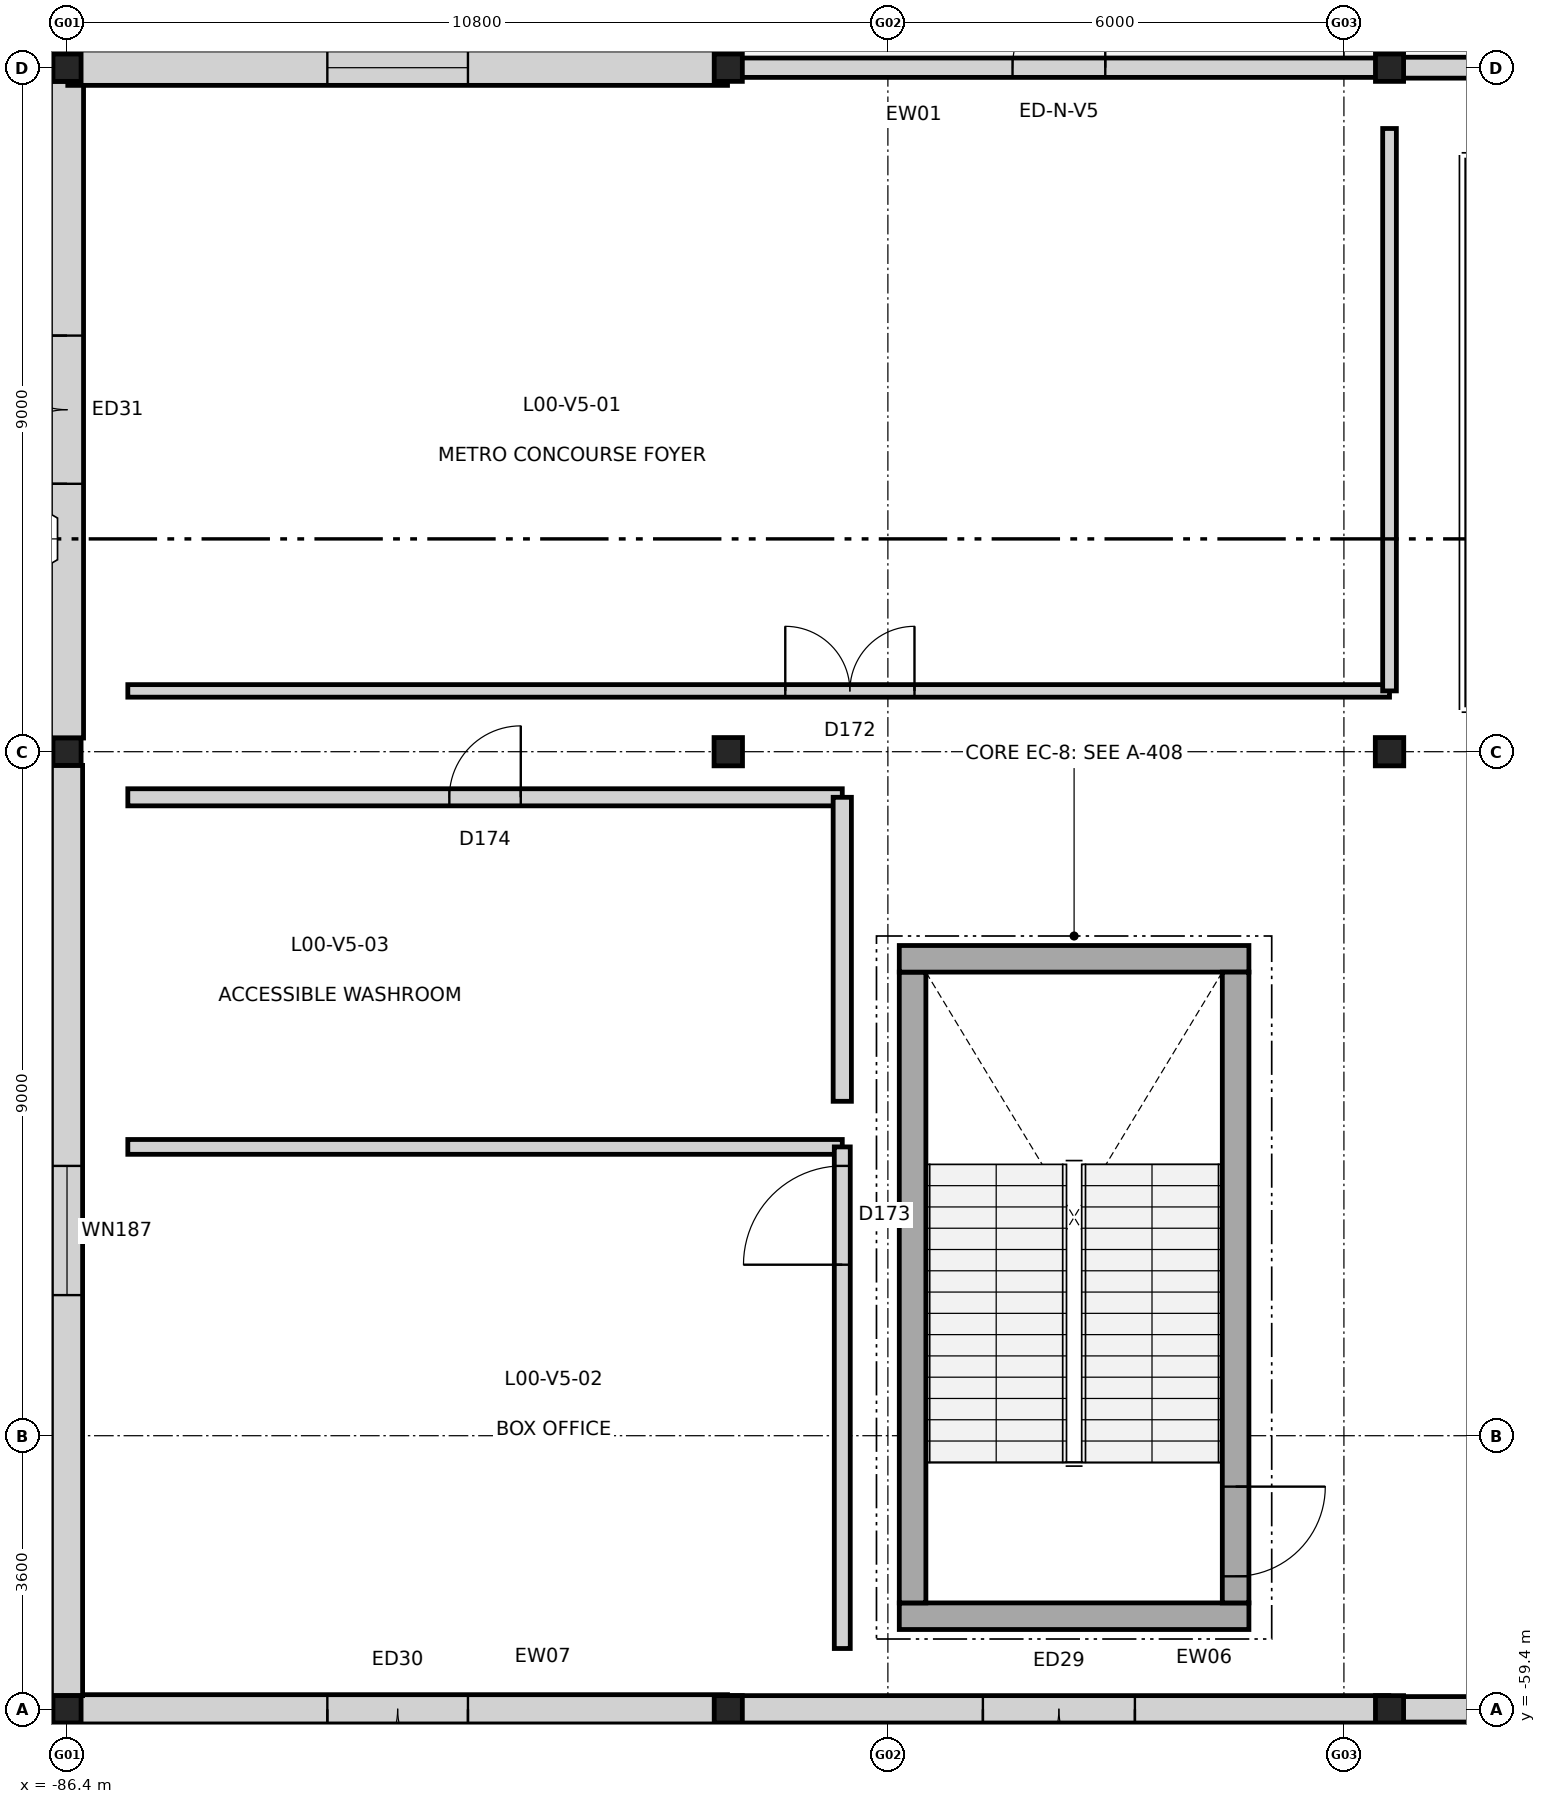
"""IFC4 building model, lengths in metres.
Left out: names, types, materials, properties, quantities, classifications, styles, units other than length and angle.
Written with IfcOpenShell. Run it as: python <this file> out.ifc"""

import sys

from ifc_helpers import new_model, si_unit, direction, frame, frame_2d, origin, origin_2d, place, context, subcontext, project, spatial, rectangle, i_section, extrude, element, fill, save


model = new_model("IFC4")
c1 = context("Model", 3, precision=1e-05, world=origin(), true_north=direction((0.0, 1.0)))
c2 = subcontext(c1, "Body", "Model", "MODEL_VIEW")
j1 = project(units=[si_unit("LENGTHUNIT", "METRE"), si_unit("PLANEANGLEUNIT", "RADIAN")], contexts=[c1])
p1 = place(None, origin())
s1 = spatial("IfcSite", under=j1, at=p1, CompositionType="ELEMENT")
p2 = place(p1, origin())
s2 = spatial("IfcBuilding", under=s1, at=p2, CompositionType="ELEMENT")
p3 = place(p2, origin())
s3 = spatial("IfcBuildingStorey", under=s2, at=p3, CompositionType="ELEMENT", Elevation=0.0)
for number, where, z_axis, x_axis in (
    (1, (-86.4, -59.4, 0.0), (0.0, 0.0, 1.0), (1.0, 0.0, 0.0)),
    (2, (-86.4, -46.8, 0.0), (0.0, 0.0, 1.0), (1.0, 0.0, 0.0)),
    (3, (-86.4, -37.8, 0.0), (0.0, 0.0, 1.0), (1.0, 0.0, 0.0)),
    (4, (-77.7, -59.4, 0.0), (0.0, 0.0, 1.0), (1.0, 0.0, 0.0)),
):
    element("IfcColumn", number, at=place(p3, frame(where, z_axis=z_axis, x_axis=x_axis)), inside=s3, PredefinedType="COLUMN", context=c2, shape_type="SweptSolid", body=[
        extrude(i_section(OverallWidth=0.37, OverallDepth=0.36, WebThickness=0.012, FlangeThickness=0.02, at=origin_2d()), origin(), (0.0, 0.0, 1.0), 5.4),
    ])
p4 = place(p3, frame((-77.7, -46.8, 0.0), z_axis=(0.0, 0.0, 1.0), x_axis=(1.0, 0.0, 0.0)))
e5 = element("IfcColumn", 5, at=p4, inside=s3, PredefinedType="COLUMN", context=c2, shape_type="SweptSolid", body=[
    extrude(i_section(OverallWidth=0.374, OverallDepth=0.372, WebThickness=0.016, FlangeThickness=0.026, at=origin_2d()), origin(), (0.0, 0.0, 1.0), 5.4),
])
for number, where, z_axis, x_axis in (
    (6, (-77.7, -37.8, 0.0), (0.0, 0.0, 1.0), (1.0, 0.0, 0.0)),
    (7, (-69.0, -59.4, 0.0), (0.0, 0.0, 1.0), (1.0, 0.0, 0.0)),
):
    element("IfcColumn", number, at=place(p3, frame(where, z_axis=z_axis, x_axis=x_axis)), inside=s3, PredefinedType="COLUMN", context=c2, shape_type="SweptSolid", body=[
        extrude(i_section(OverallWidth=0.37, OverallDepth=0.36, WebThickness=0.012, FlangeThickness=0.02, at=origin_2d()), origin(), (0.0, 0.0, 1.0), 5.4),
    ])
p5 = place(p3, frame((-69.0, -46.8, 0.0), z_axis=(0.0, 0.0, 1.0), x_axis=(1.0, 0.0, 0.0)))
e8 = element("IfcColumn", 8, at=p5, inside=s3, PredefinedType="COLUMN", context=c2, shape_type="SweptSolid", body=[
    extrude(i_section(OverallWidth=0.374, OverallDepth=0.372, WebThickness=0.016, FlangeThickness=0.026, at=origin_2d()), origin(), (0.0, 0.0, 1.0), 5.4),
])
p6 = place(p3, frame((-69.0, -37.8, 0.0), z_axis=(0.0, 0.0, 1.0), x_axis=(1.0, 0.0, 0.0)))
e9 = element("IfcColumn", 9, at=p6, inside=s3, PredefinedType="COLUMN", context=c2, shape_type="SweptSolid", body=[
    extrude(i_section(OverallWidth=0.37, OverallDepth=0.36, WebThickness=0.012, FlangeThickness=0.02, at=origin_2d()), origin(), (0.0, 0.0, 1.0), 5.4),
])
p7 = place(p3, frame((-60.31, -59.4, 0.0), z_axis=(0.0, 0.0, 1.0), x_axis=(-1.0, 0.0, 0.0)))
e10 = element("IfcWall", 10, at=p7, inside=s3, PredefinedType="STANDARD", context=c2, shape_type="SweptSolid", body=[
    extrude(rectangle(XDim=8.68, YDim=0.335, at=frame_2d((4.34, 0.0))), origin(), (0.0, 0.0, 1.0), 4.32),
])
p8 = place(p7, frame((3.14, 0.0, 0.0)))
e11 = element("IfcOpeningElement", 11, at=p8, cuts=e10, PredefinedType="OPENING", context=c2, shape_type="SweptSolid", body=[
    extrude(rectangle(XDim=2.4, YDim=2.5, at=frame_2d((1.2, 1.25))), frame((0.0, 0.177, 0.0), z_axis=(0.0, -1.0, 0.0), x_axis=(1.0, 0.0, 0.0)), (0.0, 0.0, 1.0), 0.355),
])
p9 = place(p3, frame((-69.01, -59.4, 0.0), z_axis=(0.0, 0.0, 1.0), x_axis=(-1.0, 0.0, 0.0)))
e12 = element("IfcWall", 12, at=p9, inside=s3, PredefinedType="STANDARD", context=c2, shape_type="SweptSolid", body=[
    extrude(rectangle(XDim=8.68, YDim=0.36, at=frame_2d((4.34, 0.0))), origin(), (0.0, 0.0, 1.0), 4.32),
])
p10 = place(p9, frame((3.34, 0.0, 0.0)))
e13 = element("IfcOpeningElement", 13, at=p10, cuts=e12, PredefinedType="OPENING", context=c2, shape_type="SweptSolid", body=[
    extrude(rectangle(XDim=2.0, YDim=2.4, at=frame_2d((1.0, 1.2))), frame((0.0, 0.19, 0.0), z_axis=(0.0, -1.0, 0.0), x_axis=(1.0, 0.0, 0.0)), (0.0, 0.0, 1.0), 0.38),
])
p11 = place(p3, frame((-77.71, -59.4, 0.0), z_axis=(0.0, 0.0, 1.0), x_axis=(-1.0, 0.0, 0.0)))
e14 = element("IfcWall", 14, at=p11, inside=s3, PredefinedType="STANDARD", context=c2, shape_type="SweptSolid", body=[
    extrude(rectangle(XDim=8.68, YDim=0.385, at=frame_2d((4.34, 0.0))), origin(), (0.0, 0.0, 1.0), 4.32),
])
p12 = place(p11, frame((3.415, 0.0, 0.0)))
e15 = element("IfcOpeningElement", 15, at=p12, cuts=e14, PredefinedType="OPENING", context=c2, shape_type="SweptSolid", body=[
    extrude(rectangle(XDim=1.85, YDim=2.25, at=frame_2d((0.925, 1.125))), frame((0.0, 0.202, 0.0), z_axis=(0.0, -1.0, 0.0), x_axis=(1.0, 0.0, 0.0)), (0.0, 0.0, 1.0), 0.405),
])
p13 = place(p3, frame((-86.4, -59.22, 0.0), z_axis=(0.0, 0.0, 1.0), x_axis=(0.0, 1.0, 0.0)))
e16 = element("IfcWall", 16, at=p13, inside=s3, PredefinedType="STANDARD", context=c2, shape_type="SweptSolid", body=[
    extrude(rectangle(XDim=12.24, YDim=0.41, at=frame_2d((6.12, 0.0))), origin(), (0.0, 0.0, 1.0), 4.32),
])
p14 = place(p13, frame((5.27, 0.0, 0.85)))
e17 = element("IfcOpeningElement", 17, at=p14, cuts=e16, PredefinedType="OPENING", context=c2, shape_type="SweptSolid", body=[
    extrude(rectangle(XDim=1.7, YDim=1.75, at=frame_2d((0.85, 0.875))), frame((0.0, 0.215, 0.0), z_axis=(0.0, -1.0, 0.0), x_axis=(1.0, 0.0, 0.0)), (0.0, 0.0, 1.0), 0.43),
])
p15 = place(p3, frame((-86.4, -46.62, 0.0), z_axis=(0.0, 0.0, 1.0), x_axis=(0.0, 1.0, 0.0)))
e18 = element("IfcWall", 18, at=p15, inside=s3, PredefinedType="STANDARD", context=c2, shape_type="SweptSolid", body=[
    extrude(rectangle(XDim=8.64, YDim=0.435, at=frame_2d((4.32, 0.0))), origin(), (0.0, 0.0, 1.0), 4.404),
])
p16 = place(p15, frame((3.345, 0.0, 0.0)))
e19 = element("IfcOpeningElement", 19, at=p16, cuts=e18, PredefinedType="OPENING", context=c2, shape_type="SweptSolid", body=[
    extrude(rectangle(XDim=1.95, YDim=2.35, at=frame_2d((0.975, 1.175))), frame((0.0, 0.228, 0.0), z_axis=(0.0, -1.0, 0.0), x_axis=(1.0, 0.0, 0.0)), (0.0, 0.0, 1.0), 0.455),
])
p17 = place(p3, frame((-86.39, -37.8, 0.0), z_axis=(0.0, 0.0, 1.0), x_axis=(1.0, 0.0, 0.0)))
e20 = element("IfcWall", 20, at=p17, inside=s3, PredefinedType="STANDARD", context=c2, shape_type="SweptSolid", body=[
    extrude(rectangle(XDim=8.68, YDim=0.465, at=frame_2d((4.34, 0.0))), origin(), (0.0, 0.0, 1.0), 4.32),
])
p18 = place(p17, frame((3.415, 0.0, 0.85)))
e21 = element("IfcOpeningElement", 21, at=p18, cuts=e20, PredefinedType="OPENING", context=c2, shape_type="SweptSolid", body=[
    extrude(rectangle(XDim=1.85, YDim=1.75, at=frame_2d((0.925, 0.875))), frame((0.0, 0.242, 0.0), z_axis=(0.0, -1.0, 0.0), x_axis=(1.0, 0.0, 0.0)), (0.0, 0.0, 1.0), 0.485),
])
p19 = place(p3, frame((-77.69, -37.8, 0.0), z_axis=(0.0, 0.0, 1.0), x_axis=(1.0, 0.0, 0.0)))
e22 = element("IfcWall", 22, at=p19, inside=s3, PredefinedType="STANDARD", context=c2, shape_type="SweptSolid", body=[
    extrude(rectangle(XDim=8.68, YDim=0.255, at=frame_2d((4.34, 0.0))), origin(), (0.0, 0.0, 1.0), 4.32),
])
p20 = place(p19, frame((3.73, 0.0, 0.0)))
e23 = element("IfcOpeningElement", 23, at=p20, cuts=e22, PredefinedType="OPENING", context=c2, shape_type="SweptSolid", body=[
    extrude(rectangle(XDim=1.22, YDim=2.3, at=frame_2d((0.61, 1.15))), frame((0.0, 0.137, 0.0), z_axis=(0.0, -1.0, 0.0), x_axis=(1.0, 0.0, 0.0)), (0.0, 0.0, 1.0), 0.275),
])
p21 = place(p3, frame((-68.99, -37.8, 0.0), z_axis=(0.0, 0.0, 1.0), x_axis=(1.0, 0.0, 0.0)))
e24 = element("IfcWall", 24, at=p21, inside=s3, PredefinedType="STANDARD", context=c2, shape_type="SweptSolid", body=[
    extrude(rectangle(XDim=8.68, YDim=0.275, at=frame_2d((4.34, 0.0))), origin(), (0.0, 0.0, 1.0), 4.32),
])
p22 = place(p21, frame((3.465, 0.0, 0.0)))
e25 = element("IfcOpeningElement", 25, at=p22, cuts=e24, PredefinedType="OPENING", context=c2, shape_type="SweptSolid", body=[
    extrude(rectangle(XDim=1.75, YDim=2.3, at=frame_2d((0.875, 1.15))), frame((0.0, 0.147, 0.0), z_axis=(0.0, -1.0, 0.0), x_axis=(1.0, 0.0, 0.0)), (0.0, 0.0, 1.0), 0.295),
])
p23 = place(p3, frame((-70.85, -58.175, 0.0), z_axis=(0.0, 0.0, 1.0), x_axis=(-1.0, 0.0, 0.0)))
e26 = element("IfcWall", 26, at=p23, inside=s3, PredefinedType="SHEAR", context=c2, shape_type="SweptSolid", body=[
    extrude(rectangle(XDim=4.6, YDim=0.35, at=frame_2d((2.3, 0.0))), origin(), (0.0, 0.0, 1.0), 5.4),
])
p24 = place(p3, frame((-75.275, -58.0, 0.0), z_axis=(0.0, 0.0, 1.0), x_axis=(0.0, 1.0, 0.0)))
e27 = element("IfcWall", 27, at=p24, inside=s3, PredefinedType="SHEAR", context=c2, shape_type="SweptSolid", body=[
    extrude(rectangle(XDim=8.3, YDim=0.35, at=frame_2d((4.15, 0.0))), origin(), (0.0, 0.0, 1.0), 5.4),
])
p25 = place(p3, frame((-75.45, -49.525, 0.0), z_axis=(0.0, 0.0, 1.0), x_axis=(1.0, 0.0, 0.0)))
e28 = element("IfcWall", 28, at=p25, inside=s3, PredefinedType="SHEAR", context=c2, shape_type="SweptSolid", body=[
    extrude(rectangle(XDim=4.6, YDim=0.35, at=frame_2d((2.3, 0.0))), origin(), (0.0, 0.0, 1.0), 5.4),
])
p26 = place(p3, frame((-71.025, -49.7, 0.0), z_axis=(0.0, 0.0, 1.0), x_axis=(0.0, -1.0, 0.0)))
e29 = element("IfcWall", 29, at=p26, inside=s3, PredefinedType="SHEAR", context=c2, shape_type="SweptSolid", body=[
    extrude(rectangle(XDim=8.3, YDim=0.35, at=frame_2d((4.15, 0.0))), origin(), (0.0, 0.0, 1.0), 5.4),
])
p27 = place(p26, frame((6.77, 0.0, 0.0)))
e30 = element("IfcOpeningElement", 30, at=p27, cuts=e29, PredefinedType="OPENING", context=c2, shape_type="SweptSolid", body=[
    extrude(rectangle(XDim=1.18, YDim=2.15, at=frame_2d((0.59, 1.075))), frame((0.0, 0.185, 0.0), z_axis=(0.0, -1.0, 0.0), x_axis=(1.0, 0.0, 0.0)), (0.0, 0.0, 1.0), 0.37),
])
p28 = place(p3, frame((-85.6, -46.0, 0.0), z_axis=(0.0, 0.0, 1.0), x_axis=(1.0, 0.0, 0.0)))
e31 = element("IfcWall", 31, at=p28, inside=s3, PredefinedType="PARTITIONING", context=c2, shape_type="SweptSolid", body=[
    extrude(rectangle(XDim=16.6, YDim=0.165, at=frame_2d((8.3, 0.0))), origin(), (0.0, 0.0, 1.0), 5.02),
])
p29 = place(p28, frame((8.65, 0.0, 0.0)))
e32 = element("IfcOpeningElement", 32, at=p29, cuts=e31, PredefinedType="OPENING", context=c2, shape_type="SweptSolid", body=[
    extrude(rectangle(XDim=1.7, YDim=2.25, at=frame_2d((0.85, 1.125))), frame((0.0, 0.093, 0.0), z_axis=(0.0, -1.0, 0.0), x_axis=(1.0, 0.0, 0.0)), (0.0, 0.0, 1.0), 0.185),
])
p30 = place(p3, frame((-69.0, -46.0, 0.0), z_axis=(0.0, 0.0, 1.0), x_axis=(0.0, 1.0, 0.0)))
e33 = element("IfcWall", 33, at=p30, inside=s3, PredefinedType="PARTITIONING", context=c2, shape_type="SweptSolid", body=[
    extrude(rectangle(XDim=7.4, YDim=0.18, at=frame_2d((3.7, 0.0))), origin(), (0.0, 0.0, 1.0), 4.309),
])
p31 = place(p3, frame((-85.6, -52.0, 0.0), z_axis=(0.0, 0.0, 1.0), x_axis=(1.0, 0.0, 0.0)))
e34 = element("IfcWall", 34, at=p31, inside=s3, PredefinedType="PARTITIONING", context=c2, shape_type="SweptSolid", body=[
    extrude(rectangle(XDim=9.4, YDim=0.195, at=frame_2d((4.7, 0.0))), origin(), (0.0, 0.0, 1.0), 5.02),
])
p32 = place(p3, frame((-76.2, -58.6, 0.0), z_axis=(0.0, 0.0, 1.0), x_axis=(0.0, 1.0, 0.0)))
e35 = element("IfcWall", 35, at=p32, inside=s3, PredefinedType="PARTITIONING", context=c2, shape_type="SweptSolid", body=[
    extrude(rectangle(XDim=6.6, YDim=0.21, at=frame_2d((3.3, 0.0))), origin(), (0.0, 0.0, 1.0), 5.02),
])
p33 = place(p32, frame((5.05, 0.0, 0.0)))
e36 = element("IfcOpeningElement", 36, at=p33, cuts=e35, PredefinedType="OPENING", context=c2, shape_type="SweptSolid", body=[
    extrude(rectangle(XDim=1.3, YDim=2.25, at=frame_2d((0.65, 1.125))), frame((0.0, 0.115, 0.0), z_axis=(0.0, -1.0, 0.0), x_axis=(1.0, 0.0, 0.0)), (0.0, 0.0, 1.0), 0.23),
])
p34 = place(p3, frame((-85.6, -47.4, 0.0), z_axis=(0.0, 0.0, 1.0), x_axis=(1.0, 0.0, 0.0)))
e37 = element("IfcWall", 37, at=p34, inside=s3, PredefinedType="PARTITIONING", context=c2, shape_type="SweptSolid", body=[
    extrude(rectangle(XDim=9.4, YDim=0.225, at=frame_2d((4.7, 0.0))), origin(), (0.0, 0.0, 1.0), 5.02),
])
p35 = place(p34, frame((4.23, 0.0, 0.0)))
e38 = element("IfcOpeningElement", 38, at=p35, cuts=e37, PredefinedType="OPENING", context=c2, shape_type="SweptSolid", body=[
    extrude(rectangle(XDim=0.94, YDim=2.1, at=frame_2d((0.47, 1.05))), frame((0.0, 0.123, 0.0), z_axis=(0.0, -1.0, 0.0), x_axis=(1.0, 0.0, 0.0)), (0.0, 0.0, 1.0), 0.245),
])
p36 = place(p3, frame((-76.2, -51.4, 0.0), z_axis=(0.0, 0.0, 1.0), x_axis=(0.0, 1.0, 0.0)))
e39 = element("IfcWall", 39, at=p36, inside=s3, PredefinedType="PARTITIONING", context=c2, shape_type="SweptSolid", body=[
    extrude(rectangle(XDim=4.0, YDim=0.24, at=frame_2d((2.0, 0.0))), origin(), (0.0, 0.0, 1.0), 5.02),
])
p37 = place(p10, origin())
e40 = element("IfcDoor", 40, at=p37, inside=s3, OperationType="DOUBLE_DOOR_SINGLE_SWING", PredefinedType="DOOR", context=c2, shape_type="SweptSolid", body=[
    extrude(rectangle(XDim=2.0, YDim=2.4, at=frame_2d((1.0, 1.2))), frame((0.0, 0.025, 0.0), z_axis=(0.0, -1.0, 0.0), x_axis=(1.0, 0.0, 0.0)), (0.0, 0.0, 1.0), 0.05),
])
fill(e13, e40)
p38 = place(p12, origin())
e41 = element("IfcDoor", 41, at=p38, inside=s3, OperationType="DOUBLE_DOOR_SINGLE_SWING", PredefinedType="DOOR", context=c2, shape_type="SweptSolid", body=[
    extrude(rectangle(XDim=1.85, YDim=2.25, at=frame_2d((0.925, 1.125))), frame((0.0, 0.025, 0.0), z_axis=(0.0, -1.0, 0.0), x_axis=(1.0, 0.0, 0.0)), (0.0, 0.0, 1.0), 0.05),
])
fill(e15, e41)
p39 = place(p14, origin())
e42 = element("IfcWindow", 42, at=p39, inside=s3, PartitioningType="SINGLE_PANEL", PredefinedType="WINDOW", context=c2, shape_type="SweptSolid", body=[
    extrude(rectangle(XDim=1.7, YDim=1.75, at=frame_2d((0.85, 0.875))), frame((0.0, 0.03, 0.0), z_axis=(0.0, -1.0, 0.0), x_axis=(1.0, 0.0, 0.0)), (0.0, 0.0, 1.0), 0.06),
])
fill(e17, e42)
p40 = place(p16, origin())
e43 = element("IfcDoor", 43, at=p40, inside=s3, OperationType="DOUBLE_DOOR_SINGLE_SWING", PredefinedType="DOOR", context=c2, shape_type="SweptSolid", body=[
    extrude(rectangle(XDim=1.95, YDim=2.35, at=frame_2d((0.975, 1.175))), frame((0.0, 0.025, 0.0), z_axis=(0.0, -1.0, 0.0), x_axis=(1.0, 0.0, 0.0)), (0.0, 0.0, 1.0), 0.05),
])
fill(e19, e43)
p41 = place(p18, origin())
e44 = element("IfcWindow", 44, at=p41, inside=s3, PartitioningType="SINGLE_PANEL", PredefinedType="WINDOW", context=c2, shape_type="SweptSolid", body=[
    extrude(rectangle(XDim=1.85, YDim=1.75, at=frame_2d((0.925, 0.875))), frame((0.0, 0.03, 0.0), z_axis=(0.0, -1.0, 0.0), x_axis=(1.0, 0.0, 0.0)), (0.0, 0.0, 1.0), 0.06),
])
fill(e21, e44)
p42 = place(p20, origin())
e45 = element("IfcDoor", 45, at=p42, inside=s3, OperationType="SINGLE_SWING_RIGHT", PredefinedType="DOOR", context=c2, shape_type="SweptSolid", body=[
    extrude(rectangle(XDim=1.22, YDim=2.3, at=frame_2d((0.61, 1.15))), frame((0.0, 0.025, 0.0), z_axis=(0.0, -1.0, 0.0), x_axis=(1.0, 0.0, 0.0)), (0.0, 0.0, 1.0), 0.05),
])
fill(e23, e45)
p43 = place(p27, origin())
e46 = element("IfcDoor", 46, at=p43, inside=s3, OperationType="SINGLE_SWING_LEFT", PredefinedType="DOOR", context=c2, shape_type="SweptSolid", body=[
    extrude(rectangle(XDim=1.18, YDim=2.15, at=frame_2d((0.59, 1.075))), frame((0.0, 0.025, 0.0), z_axis=(0.0, -1.0, 0.0), x_axis=(1.0, 0.0, 0.0)), (0.0, 0.0, 1.0), 0.05),
])
fill(e30, e46)
p44 = place(p29, origin())
e47 = element("IfcDoor", 47, at=p44, inside=s3, OperationType="DOUBLE_DOOR_SINGLE_SWING", PredefinedType="DOOR", context=c2, shape_type="SweptSolid", body=[
    extrude(rectangle(XDim=1.7, YDim=2.25, at=frame_2d((0.85, 1.125))), frame((0.0, 0.025, 0.0), z_axis=(0.0, -1.0, 0.0), x_axis=(1.0, 0.0, 0.0)), (0.0, 0.0, 1.0), 0.05),
])
fill(e32, e47)
p45 = place(p33, origin())
e48 = element("IfcDoor", 48, at=p45, inside=s3, OperationType="SINGLE_SWING_LEFT", PredefinedType="DOOR", context=c2, shape_type="SweptSolid", body=[
    extrude(rectangle(XDim=1.3, YDim=2.25, at=frame_2d((0.65, 1.125))), frame((0.0, 0.025, 0.0), z_axis=(0.0, -1.0, 0.0), x_axis=(1.0, 0.0, 0.0)), (0.0, 0.0, 1.0), 0.05),
])
fill(e36, e48)
p46 = place(p35, origin())
e49 = element("IfcDoor", 49, at=p46, inside=s3, OperationType="SINGLE_SWING_RIGHT", PredefinedType="DOOR", context=c2, shape_type="SweptSolid", body=[
    extrude(rectangle(XDim=0.94, YDim=2.1, at=frame_2d((0.47, 1.05))), frame((0.0, 0.025, 0.0), z_axis=(0.0, -1.0, 0.0), x_axis=(1.0, 0.0, 0.0)), (0.0, 0.0, 1.0), 0.05),
])
fill(e38, e49)
save(model, sys.argv[1])
